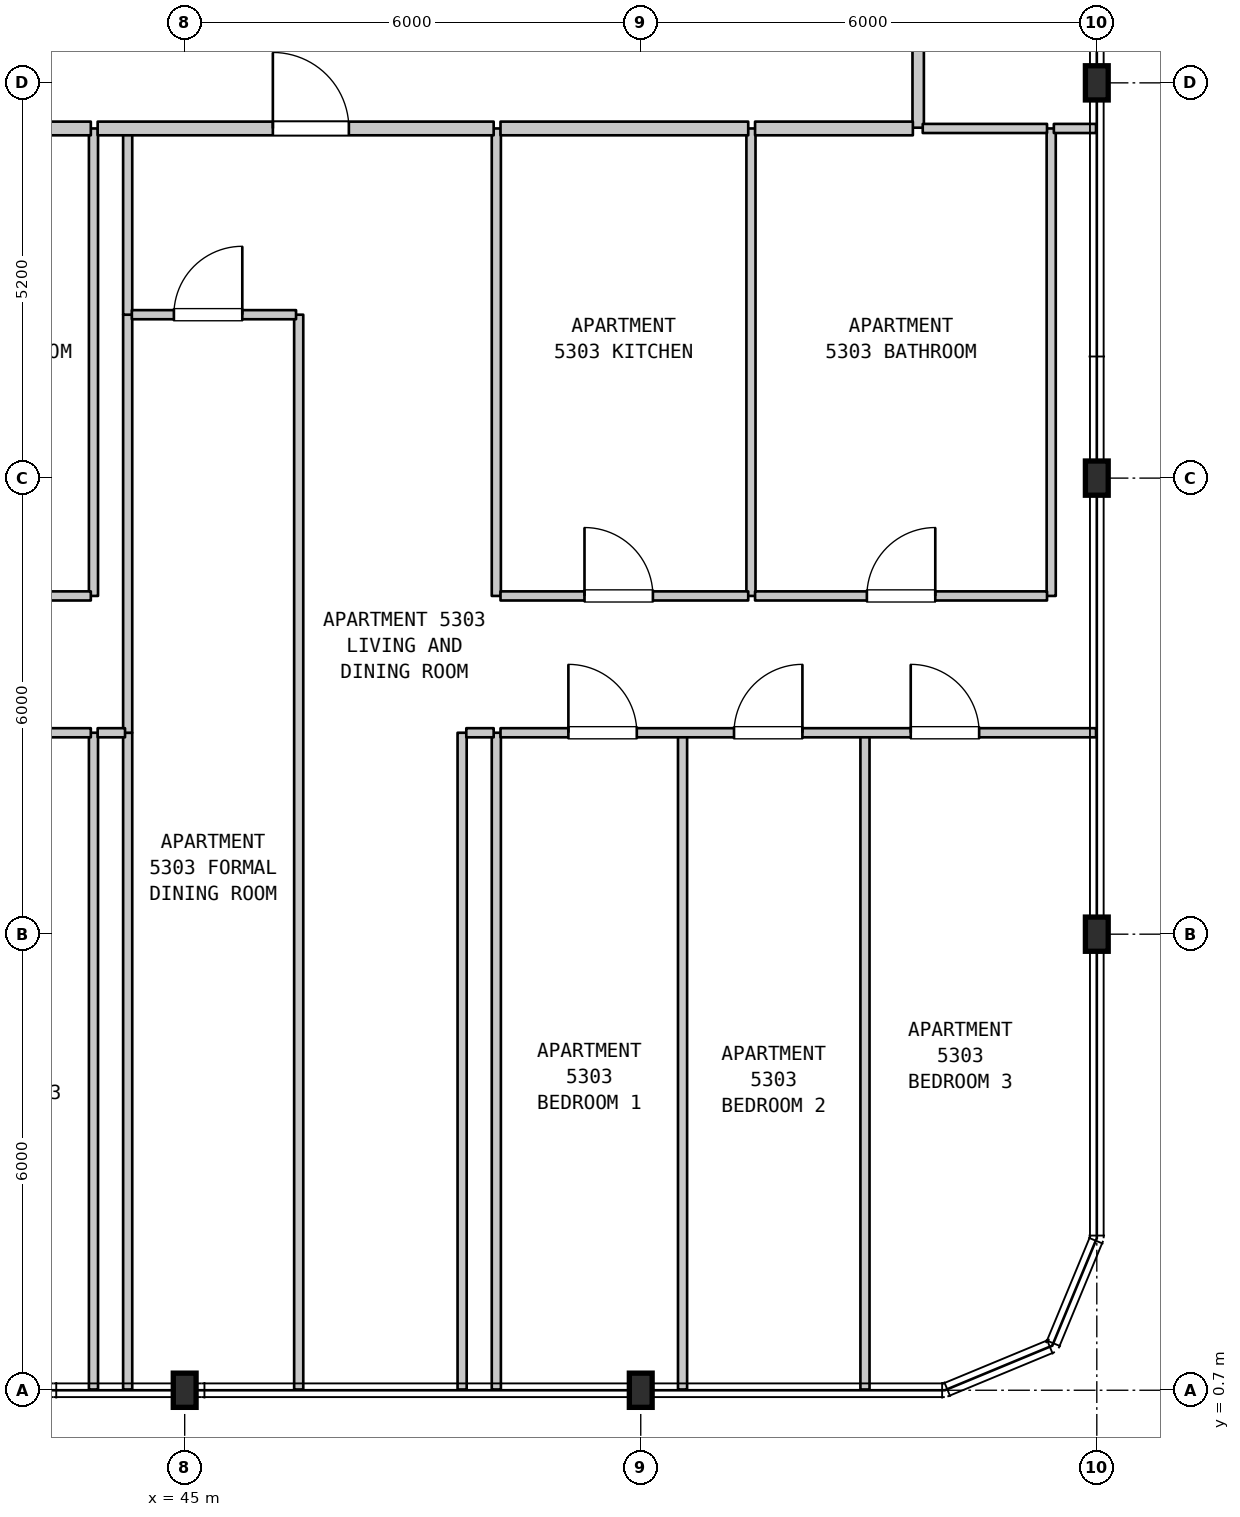
"""IFC4 building model, lengths in metres.
Left out: names, types, materials, properties, quantities, classifications, styles, units other than length and angle.
Written with IfcOpenShell. Run it as: python <this file> out.ifc"""

import sys

from ifc_helpers import new_model, si_unit, direction, frame, frame_2d, origin, origin_2d, place, context, subcontext, project, spatial, rectangle, i_section, extrude, element, fill, save


model = new_model("IFC4")
c1 = context("Model", 3, precision=1e-05, world=origin(), true_north=direction((0.0, 1.0)))
c2 = subcontext(c1, "Body", "Model", "MODEL_VIEW")
j1 = project(units=[si_unit("LENGTHUNIT", "METRE"), si_unit("PLANEANGLEUNIT", "RADIAN")], contexts=[c1])
p1 = place(None, origin())
s1 = spatial("IfcSite", under=j1, at=p1, CompositionType="ELEMENT")
p2 = place(p1, origin())
s2 = spatial("IfcBuilding", under=s1, at=p2, CompositionType="ELEMENT")
p3 = place(p2, frame((0.0, 0.0, 214.3)))
s3 = spatial("IfcBuildingStorey", under=s2, at=p3, CompositionType="ELEMENT", Elevation=214.3)
for number, where, z_axis, x_axis in (
    (1, (45.0, 0.7, 0.0), (0.0, 0.0, 1.0), (1.0, 0.0, 0.0)),
    (2, (51.0, 0.7, 0.0), (0.0, 0.0, 1.0), (1.0, 0.0, 0.0)),
    (3, (57.0, 6.7, 0.0), (0.0, 0.0, 1.0), (1.0, 0.0, 0.0)),
    (4, (57.0, 12.7, 0.0), (0.0, 0.0, 1.0), (1.0, 0.0, 0.0)),
    (5, (57.0, 17.9, 0.0), (0.0, 0.0, 1.0), (1.0, 0.0, 0.0)),
):
    element("IfcColumn", number, at=place(p3, frame(where, z_axis=z_axis, x_axis=x_axis)), inside=s3, PredefinedType="COLUMN", context=c2, shape_type="SweptSolid", body=[
        extrude(i_section(OverallWidth=0.3, OverallDepth=0.45, WebThickness=0.014, FlangeThickness=0.026, FilletRadius=0.027, at=origin_2d()), origin(), (0.0, 0.0, 1.0), 3.7),
    ])
p4 = place(p3, frame((43.8, 0.71, 0.0), z_axis=(0.0, 0.0, 1.0), x_axis=(0.0, 1.0, 0.0)))
e6 = element("IfcWall", 6, at=p4, inside=s3, PredefinedType="PARTITIONING", context=c2, shape_type="SweptSolid", body=[
    extrude(rectangle(XDim=8.64, YDim=0.12, at=frame_2d((4.32, 0.0))), origin(), (0.0, 0.0, 1.0), 3.38),
])
p5 = place(p3, frame((43.8, 11.15, 0.0), z_axis=(0.0, 0.0, 1.0), x_axis=(0.0, 1.0, 0.0)))
e7 = element("IfcWall", 7, at=p5, inside=s3, PredefinedType="PARTITIONING", context=c2, shape_type="SweptSolid", body=[
    extrude(rectangle(XDim=6.15, YDim=0.12, at=frame_2d((3.075, 0.0))), origin(), (0.0, 0.0, 1.0), 3.38),
])
p6 = place(p3, frame((44.25, 0.71, 0.0), z_axis=(0.0, 0.0, 1.0), x_axis=(0.0, 1.0, 0.0)))
e8 = element("IfcWall", 8, at=p6, inside=s3, PredefinedType="PARTITIONING", context=c2, shape_type="SweptSolid", body=[
    extrude(rectangle(XDim=8.64, YDim=0.12, at=frame_2d((4.32, 0.0))), origin(), (0.0, 0.0, 1.0), 3.38),
])
p7 = place(p3, frame((44.25, 9.35, 0.0), z_axis=(0.0, 0.0, 1.0), x_axis=(0.0, 1.0, 0.0)))
e9 = element("IfcWall", 9, at=p7, inside=s3, PredefinedType="PARTITIONING", context=c2, shape_type="SweptSolid", body=[
    extrude(rectangle(XDim=5.5, YDim=0.12, at=frame_2d((2.75, 0.0))), origin(), (0.0, 0.0, 1.0), 3.38),
])
p8 = place(p3, frame((44.25, 14.85, 0.0), z_axis=(0.0, 0.0, 1.0), x_axis=(0.0, 1.0, 0.0)))
e10 = element("IfcWall", 10, at=p8, inside=s3, PredefinedType="PARTITIONING", context=c2, shape_type="SweptSolid", body=[
    extrude(rectangle(XDim=2.45, YDim=0.12, at=frame_2d((1.225, 0.0))), origin(), (0.0, 0.0, 1.0), 3.38),
])
p9 = place(p3, frame((46.5, 0.71, 0.0), z_axis=(0.0, 0.0, 1.0), x_axis=(0.0, 1.0, 0.0)))
e11 = element("IfcWall", 11, at=p9, inside=s3, PredefinedType="PARTITIONING", context=c2, shape_type="SweptSolid", body=[
    extrude(rectangle(XDim=14.14, YDim=0.12, at=frame_2d((7.07, 0.0))), origin(), (0.0, 0.0, 1.0), 3.38),
])
for number, where, z_axis, x_axis in (
    (12, (48.65, 0.71, 0.0), (0.0, 0.0, 1.0), (0.0, 1.0, 0.0)),
    (13, (49.1, 0.71, 0.0), (0.0, 0.0, 1.0), (0.0, 1.0, 0.0)),
):
    element("IfcWall", number, at=place(p3, frame(where, z_axis=z_axis, x_axis=x_axis)), inside=s3, PredefinedType="PARTITIONING", context=c2, shape_type="SweptSolid", body=[
        extrude(rectangle(XDim=8.64, YDim=0.12, at=frame_2d((4.32, 0.0))), origin(), (0.0, 0.0, 1.0), 3.38),
    ])
p10 = place(p3, frame((49.1, 11.15, 0.0), z_axis=(0.0, 0.0, 1.0), x_axis=(0.0, 1.0, 0.0)))
e14 = element("IfcWall", 14, at=p10, inside=s3, PredefinedType="PARTITIONING", context=c2, shape_type="SweptSolid", body=[
    extrude(rectangle(XDim=6.15, YDim=0.12, at=frame_2d((3.075, 0.0))), origin(), (0.0, 0.0, 1.0), 3.38),
])
p11 = place(p3, frame((51.55, 0.71, 0.0), z_axis=(0.0, 0.0, 1.0), x_axis=(0.0, 1.0, 0.0)))
e15 = element("IfcWall", 15, at=p11, inside=s3, PredefinedType="PARTITIONING", context=c2, shape_type="SweptSolid", body=[
    extrude(rectangle(XDim=8.64, YDim=0.12, at=frame_2d((4.32, 0.0))), origin(), (0.0, 0.0, 1.0), 3.38),
])
p12 = place(p3, frame((52.45, 11.15, 0.0), z_axis=(0.0, 0.0, 1.0), x_axis=(0.0, 1.0, 0.0)))
e16 = element("IfcWall", 16, at=p12, inside=s3, PredefinedType="PARTITIONING", context=c2, shape_type="SweptSolid", body=[
    extrude(rectangle(XDim=6.15, YDim=0.12, at=frame_2d((3.075, 0.0))), origin(), (0.0, 0.0, 1.0), 3.38),
])
p13 = place(p3, frame((53.95, 0.71, 0.0), z_axis=(0.0, 0.0, 1.0), x_axis=(0.0, 1.0, 0.0)))
e17 = element("IfcWall", 17, at=p13, inside=s3, PredefinedType="PARTITIONING", context=c2, shape_type="SweptSolid", body=[
    extrude(rectangle(XDim=8.64, YDim=0.12, at=frame_2d((4.32, 0.0))), origin(), (0.0, 0.0, 1.0), 3.38),
])
p14 = place(p3, frame((54.65, 17.31, 0.0), z_axis=(0.0, 0.0, 1.0), x_axis=(0.0, 1.0, 0.0)))
e18 = element("IfcWall", 18, at=p14, inside=s3, PredefinedType="STANDARD", context=c2, shape_type="SweptSolid", body=[
    extrude(rectangle(XDim=2.19, YDim=0.15, at=frame_2d((1.095, 0.0))), origin(), (0.0, 0.0, 1.0), 3.38),
])
p15 = place(p3, frame((56.4, 11.15, 0.0), z_axis=(0.0, 0.0, 1.0), x_axis=(0.0, 1.0, 0.0)))
e19 = element("IfcWall", 19, at=p15, inside=s3, PredefinedType="PARTITIONING", context=c2, shape_type="SweptSolid", body=[
    extrude(rectangle(XDim=6.15, YDim=0.12, at=frame_2d((3.075, 0.0))), origin(), (0.0, 0.0, 1.0), 3.38),
])
p16 = place(p3, frame((34.795, 9.35, 0.0), z_axis=(0.0, 0.0, 1.0), x_axis=(1.0, 0.0, 0.0)))
e20 = element("IfcWall", 20, at=p16, inside=s3, PredefinedType="PARTITIONING", context=c2, shape_type="SweptSolid", body=[
    extrude(rectangle(XDim=8.97, YDim=0.12, at=frame_2d((4.485, 0.0))), origin(), (0.0, 0.0, 1.0), 3.38),
])
p17 = place(p16, frame((1.119, 0.0, 0.0)))
e21 = element("IfcOpeningElement", 21, at=p17, cuts=e20, PredefinedType="OPENING", context=c2, shape_type="SweptSolid", body=[
    extrude(rectangle(XDim=0.9, YDim=2.15, at=frame_2d((0.45, 1.075))), frame((0.0, 0.07, 0.0), z_axis=(0.0, -1.0, 0.0), x_axis=(1.0, 0.0, 0.0)), (0.0, 0.0, 1.0), 0.14),
])
p18 = place(p16, frame((3.962, 0.0, 0.0)))
e22 = element("IfcOpeningElement", 22, at=p18, cuts=e20, PredefinedType="OPENING", context=c2, shape_type="SweptSolid", body=[
    extrude(rectangle(XDim=0.9, YDim=2.15, at=frame_2d((0.45, 1.075))), frame((0.0, 0.07, 0.0), z_axis=(0.0, -1.0, 0.0), x_axis=(1.0, 0.0, 0.0)), (0.0, 0.0, 1.0), 0.14),
])
p19 = place(p16, frame((6.809, 0.0, 0.0)))
e23 = element("IfcOpeningElement", 23, at=p19, cuts=e20, PredefinedType="OPENING", context=c2, shape_type="SweptSolid", body=[
    extrude(rectangle(XDim=0.9, YDim=2.15, at=frame_2d((0.45, 1.075))), frame((0.0, 0.07, 0.0), z_axis=(0.0, -1.0, 0.0), x_axis=(1.0, 0.0, 0.0)), (0.0, 0.0, 1.0), 0.14),
])
p20 = place(p3, frame((43.855, 9.35, 0.0), z_axis=(0.0, 0.0, 1.0), x_axis=(1.0, 0.0, 0.0)))
e24 = element("IfcWall", 24, at=p20, inside=s3, PredefinedType="PARTITIONING", context=c2, shape_type="SweptSolid", body=[
    extrude(rectangle(XDim=0.36, YDim=0.12, at=frame_2d((0.18, 0.0))), origin(), (0.0, 0.0, 1.0), 3.38),
])
p21 = place(p3, frame((48.705, 9.35, 0.0), z_axis=(0.0, 0.0, 1.0), x_axis=(1.0, 0.0, 0.0)))
e25 = element("IfcWall", 25, at=p21, inside=s3, PredefinedType="PARTITIONING", context=c2, shape_type="SweptSolid", body=[
    extrude(rectangle(XDim=0.36, YDim=0.12, at=frame_2d((0.18, 0.0))), origin(), (0.0, 0.0, 1.0), 3.38),
])
p22 = place(p3, frame((49.155, 9.35, 0.0), z_axis=(0.0, 0.0, 1.0), x_axis=(1.0, 0.0, 0.0)))
e26 = element("IfcWall", 26, at=p22, inside=s3, PredefinedType="PARTITIONING", context=c2, shape_type="SweptSolid", body=[
    extrude(rectangle(XDim=7.835, YDim=0.12, at=frame_2d((3.917, 0.0))), origin(), (0.0, 0.0, 1.0), 3.38),
])
p23 = place(p22, frame((0.893, 0.0, 0.0)))
e27 = element("IfcOpeningElement", 27, at=p23, cuts=e26, PredefinedType="OPENING", context=c2, shape_type="SweptSolid", body=[
    extrude(rectangle(XDim=0.9, YDim=2.15, at=frame_2d((0.45, 1.075))), frame((0.0, 0.07, 0.0), z_axis=(0.0, -1.0, 0.0), x_axis=(1.0, 0.0, 0.0)), (0.0, 0.0, 1.0), 0.14),
])
p24 = place(p22, frame((3.072, 0.0, 0.0)))
e28 = element("IfcOpeningElement", 28, at=p24, cuts=e26, PredefinedType="OPENING", context=c2, shape_type="SweptSolid", body=[
    extrude(rectangle(XDim=0.9, YDim=2.15, at=frame_2d((0.45, 1.075))), frame((0.0, 0.07, 0.0), z_axis=(0.0, -1.0, 0.0), x_axis=(1.0, 0.0, 0.0)), (0.0, 0.0, 1.0), 0.14),
])
p25 = place(p22, frame((5.397, 0.0, 0.0)))
e29 = element("IfcOpeningElement", 29, at=p25, cuts=e26, PredefinedType="OPENING", context=c2, shape_type="SweptSolid", body=[
    extrude(rectangle(XDim=0.9, YDim=2.15, at=frame_2d((0.45, 1.075))), frame((0.0, 0.07, 0.0), z_axis=(0.0, -1.0, 0.0), x_axis=(1.0, 0.0, 0.0)), (0.0, 0.0, 1.0), 0.14),
])
p26 = place(p3, frame((41.318, 11.15, 0.0), z_axis=(0.0, 0.0, 1.0), x_axis=(1.0, 0.0, 0.0)))
e30 = element("IfcWall", 30, at=p26, inside=s3, PredefinedType="PARTITIONING", context=c2, shape_type="SweptSolid", body=[
    extrude(rectangle(XDim=2.447, YDim=0.12, at=frame_2d((1.223, 0.0))), origin(), (0.0, 0.0, 1.0), 3.38),
])
p27 = place(p26, frame((0.774, 0.0, 0.0)))
e31 = element("IfcOpeningElement", 31, at=p27, cuts=e30, PredefinedType="OPENING", context=c2, shape_type="SweptSolid", body=[
    extrude(rectangle(XDim=0.9, YDim=2.1, at=frame_2d((0.45, 1.05))), frame((0.0, 0.07, 0.0), z_axis=(0.0, -1.0, 0.0), x_axis=(1.0, 0.0, 0.0)), (0.0, 0.0, 1.0), 0.14),
])
p28 = place(p3, frame((49.155, 11.15, 0.0), z_axis=(0.0, 0.0, 1.0), x_axis=(1.0, 0.0, 0.0)))
e32 = element("IfcWall", 32, at=p28, inside=s3, PredefinedType="PARTITIONING", context=c2, shape_type="SweptSolid", body=[
    extrude(rectangle(XDim=3.259, YDim=0.12, at=frame_2d((1.629, 0.0))), origin(), (0.0, 0.0, 1.0), 3.38),
])
p29 = place(p28, frame((1.105, 0.0, 0.0)))
e33 = element("IfcOpeningElement", 33, at=p29, cuts=e32, PredefinedType="OPENING", context=c2, shape_type="SweptSolid", body=[
    extrude(rectangle(XDim=0.9, YDim=2.15, at=frame_2d((0.45, 1.075))), frame((0.0, 0.07, 0.0), z_axis=(0.0, -1.0, 0.0), x_axis=(1.0, 0.0, 0.0)), (0.0, 0.0, 1.0), 0.14),
])
p30 = place(p3, frame((52.504, 11.15, 0.0), z_axis=(0.0, 0.0, 1.0), x_axis=(1.0, 0.0, 0.0)))
e34 = element("IfcWall", 34, at=p30, inside=s3, PredefinedType="PARTITIONING", context=c2, shape_type="SweptSolid", body=[
    extrude(rectangle(XDim=3.841, YDim=0.12, at=frame_2d((1.92, 0.0))), origin(), (0.0, 0.0, 1.0), 3.38),
])
p31 = place(p30, frame((1.471, 0.0, 0.0)))
e35 = element("IfcOpeningElement", 35, at=p31, cuts=e34, PredefinedType="OPENING", context=c2, shape_type="SweptSolid", body=[
    extrude(rectangle(XDim=0.9, YDim=2.1, at=frame_2d((0.45, 1.05))), frame((0.0, 0.07, 0.0), z_axis=(0.0, -1.0, 0.0), x_axis=(1.0, 0.0, 0.0)), (0.0, 0.0, 1.0), 0.14),
])
p32 = place(p3, frame((44.305, 14.85, 0.0), z_axis=(0.0, 0.0, 1.0), x_axis=(1.0, 0.0, 0.0)))
e36 = element("IfcWall", 36, at=p32, inside=s3, PredefinedType="PARTITIONING", context=c2, shape_type="SweptSolid", body=[
    extrude(rectangle(XDim=2.16, YDim=0.12, at=frame_2d((1.08, 0.0))), origin(), (0.0, 0.0, 1.0), 3.38),
])
p33 = place(p32, frame((0.553, 0.0, 0.0)))
e37 = element("IfcOpeningElement", 37, at=p33, cuts=e36, PredefinedType="OPENING", context=c2, shape_type="SweptSolid", body=[
    extrude(rectangle(XDim=0.9, YDim=2.15, at=frame_2d((0.45, 1.075))), frame((0.0, 0.07, 0.0), z_axis=(0.0, -1.0, 0.0), x_axis=(1.0, 0.0, 0.0)), (0.0, 0.0, 1.0), 0.14),
])
p34 = place(p3, frame((41.318, 17.3, 0.0), z_axis=(0.0, 0.0, 1.0), x_axis=(1.0, 0.0, 0.0)))
e38 = element("IfcWall", 38, at=p34, inside=s3, PredefinedType="STANDARD", context=c2, shape_type="SweptSolid", body=[
    extrude(rectangle(XDim=2.447, YDim=0.18, at=frame_2d((1.223, 0.0))), origin(), (0.0, 0.0, 1.0), 3.38),
])
p35 = place(p3, frame((43.855, 17.3, 0.0), z_axis=(0.0, 0.0, 1.0), x_axis=(1.0, 0.0, 0.0)))
e39 = element("IfcWall", 39, at=p35, inside=s3, PredefinedType="STANDARD", context=c2, shape_type="SweptSolid", body=[
    extrude(rectangle(XDim=5.21, YDim=0.18, at=frame_2d((2.605, 0.0))), origin(), (0.0, 0.0, 1.0), 3.38),
])
p36 = place(p35, frame((2.305, 0.0, 0.0)))
e40 = element("IfcOpeningElement", 40, at=p36, cuts=e39, PredefinedType="OPENING", context=c2, shape_type="SweptSolid", body=[
    extrude(rectangle(XDim=1.0, YDim=2.15, at=frame_2d((0.5, 1.075))), frame((0.0, 0.1, 0.0), z_axis=(0.0, -1.0, 0.0), x_axis=(1.0, 0.0, 0.0)), (0.0, 0.0, 1.0), 0.2),
])
p37 = place(p3, frame((49.155, 17.3, 0.0), z_axis=(0.0, 0.0, 1.0), x_axis=(1.0, 0.0, 0.0)))
e41 = element("IfcWall", 41, at=p37, inside=s3, PredefinedType="STANDARD", context=c2, shape_type="SweptSolid", body=[
    extrude(rectangle(XDim=3.259, YDim=0.18, at=frame_2d((1.629, 0.0))), origin(), (0.0, 0.0, 1.0), 3.38),
])
p38 = place(p3, frame((52.504, 17.3, 0.0), z_axis=(0.0, 0.0, 1.0), x_axis=(1.0, 0.0, 0.0)))
e42 = element("IfcWall", 42, at=p38, inside=s3, PredefinedType="STANDARD", context=c2, shape_type="SweptSolid", body=[
    extrude(rectangle(XDim=2.076, YDim=0.18, at=frame_2d((1.038, 0.0))), origin(), (0.0, 0.0, 1.0), 3.38),
])
p39 = place(p3, frame((54.71, 17.3, 0.0), z_axis=(0.0, 0.0, 1.0), x_axis=(1.0, 0.0, 0.0)))
e43 = element("IfcWall", 43, at=p39, inside=s3, PredefinedType="PARTITIONING", context=c2, shape_type="SweptSolid", body=[
    extrude(rectangle(XDim=1.635, YDim=0.12, at=frame_2d((0.817, 0.0))), origin(), (0.0, 0.0, 1.0), 3.38),
])
p40 = place(p3, frame((56.435, 17.3, 0.0), z_axis=(0.0, 0.0, 1.0), x_axis=(1.0, 0.0, 0.0)))
e44 = element("IfcWall", 44, at=p40, inside=s3, PredefinedType="PARTITIONING", context=c2, shape_type="SweptSolid", body=[
    extrude(rectangle(XDim=0.555, YDim=0.12, at=frame_2d((0.277, 0.0))), origin(), (0.0, 0.0, 1.0), 3.38),
])
p41 = place(p23, origin())
e45 = element("IfcDoor", 45, at=p41, inside=s3, OperationType="SINGLE_SWING_LEFT", PredefinedType="DOOR", context=c2, shape_type="SweptSolid", body=[
    extrude(rectangle(XDim=0.9, YDim=2.15, at=frame_2d((0.45, 1.075))), frame((0.0, 0.025, 0.0), z_axis=(0.0, -1.0, 0.0), x_axis=(1.0, 0.0, 0.0)), (0.0, 0.0, 1.0), 0.05),
])
fill(e27, e45)
p42 = place(p24, origin())
e46 = element("IfcDoor", 46, at=p42, inside=s3, OperationType="SINGLE_SWING_RIGHT", PredefinedType="DOOR", context=c2, shape_type="SweptSolid", body=[
    extrude(rectangle(XDim=0.9, YDim=2.15, at=frame_2d((0.45, 1.075))), frame((0.0, 0.025, 0.0), z_axis=(0.0, -1.0, 0.0), x_axis=(1.0, 0.0, 0.0)), (0.0, 0.0, 1.0), 0.05),
])
fill(e28, e46)
p43 = place(p25, origin())
e47 = element("IfcDoor", 47, at=p43, inside=s3, OperationType="SINGLE_SWING_LEFT", PredefinedType="DOOR", context=c2, shape_type="SweptSolid", body=[
    extrude(rectangle(XDim=0.9, YDim=2.15, at=frame_2d((0.45, 1.075))), frame((0.0, 0.025, 0.0), z_axis=(0.0, -1.0, 0.0), x_axis=(1.0, 0.0, 0.0)), (0.0, 0.0, 1.0), 0.05),
])
fill(e29, e47)
p44 = place(p29, origin())
e48 = element("IfcDoor", 48, at=p44, inside=s3, OperationType="SINGLE_SWING_LEFT", PredefinedType="DOOR", context=c2, shape_type="SweptSolid", body=[
    extrude(rectangle(XDim=0.9, YDim=2.15, at=frame_2d((0.45, 1.075))), frame((0.0, 0.025, 0.0), z_axis=(0.0, -1.0, 0.0), x_axis=(1.0, 0.0, 0.0)), (0.0, 0.0, 1.0), 0.05),
])
fill(e33, e48)
p45 = place(p31, origin())
e49 = element("IfcDoor", 49, at=p45, inside=s3, OperationType="SINGLE_SWING_RIGHT", PredefinedType="DOOR", context=c2, shape_type="SweptSolid", body=[
    extrude(rectangle(XDim=0.9, YDim=2.1, at=frame_2d((0.45, 1.05))), frame((0.0, 0.025, 0.0), z_axis=(0.0, -1.0, 0.0), x_axis=(1.0, 0.0, 0.0)), (0.0, 0.0, 1.0), 0.05),
])
fill(e35, e49)
p46 = place(p33, origin())
e50 = element("IfcDoor", 50, at=p46, inside=s3, OperationType="SINGLE_SWING_RIGHT", PredefinedType="DOOR", context=c2, shape_type="SweptSolid", body=[
    extrude(rectangle(XDim=0.9, YDim=2.15, at=frame_2d((0.45, 1.075))), frame((0.0, 0.025, 0.0), z_axis=(0.0, -1.0, 0.0), x_axis=(1.0, 0.0, 0.0)), (0.0, 0.0, 1.0), 0.05),
])
fill(e37, e50)
p47 = place(p36, origin())
e51 = element("IfcDoor", 51, at=p47, inside=s3, OperationType="SINGLE_SWING_LEFT", PredefinedType="DOOR", context=c2, shape_type="SweptSolid", body=[
    extrude(rectangle(XDim=1.0, YDim=2.15, at=frame_2d((0.5, 1.075))), frame((0.0, 0.025, 0.0), z_axis=(0.0, -1.0, 0.0), x_axis=(1.0, 0.0, 0.0)), (0.0, 0.0, 1.0), 0.05),
])
fill(e40, e51)
save(model, sys.argv[1])
